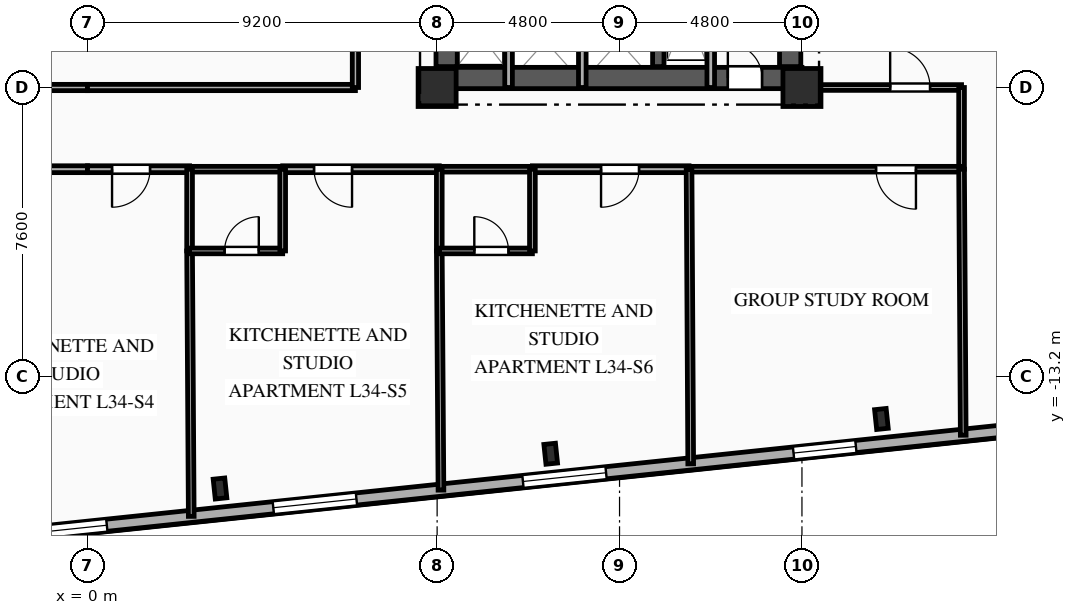
"""IFC4 building model, lengths in metres.
Left out: names, types, materials, properties, quantities, classifications, styles, units other than length and angle.
Written with IfcOpenShell. Run it as: python <this file> out.ifc"""

import sys

from ifc_helpers import new_model, si_unit, direction, frame, frame_2d, origin, origin_2d, place, context, subcontext, project, spatial, rectangle, i_section, extrude, element, fill, save


model = new_model("IFC4")
c1 = context("Model", 3, precision=1e-05, world=origin(), true_north=direction((0.0, 1.0)))
c2 = subcontext(c1, "Body", "Model", "MODEL_VIEW")
j1 = project(units=[si_unit("LENGTHUNIT", "METRE"), si_unit("PLANEANGLEUNIT", "RADIAN")], contexts=[c1])
p1 = place(None, origin())
s1 = spatial("IfcSite", under=j1, at=p1, CompositionType="ELEMENT")
p2 = place(p1, origin())
s2 = spatial("IfcBuilding", under=s1, at=p2, CompositionType="ELEMENT")
p3 = place(p2, frame((0.0, 0.0, 122.55)))
s3 = spatial("IfcBuildingStorey", under=s2, at=p3, CompositionType="ELEMENT", Elevation=122.55)
for number, where, z_axis, x_axis in (
    (1, (9.2, -5.6, 0.0), (0.0, 0.0, 1.0), (1.0, 0.0, 0.0)),
    (2, (18.8, -5.6, 0.0), (0.0, 0.0, 1.0), (1.0, 0.0, 0.0)),
):
    element("IfcColumn", number, at=place(p3, frame(where, z_axis=z_axis, x_axis=x_axis)), inside=s3, PredefinedType="COLUMN", context=c2, shape_type="SweptSolid", body=[
        extrude(rectangle(XDim=1.0, YDim=1.0, at=origin_2d()), origin(), (0.0, 0.0, 1.0), 3.35),
    ])
for number, where, z_axis, x_axis in (
    (3, (3.487, -16.151, 0.0), (0.0, 0.0, 1.0), (0.995, 0.105, 0.0)),
    (4, (12.189, -15.237, 0.0), (0.0, 0.0, 1.0), (0.995, 0.105, 0.0)),
    (5, (20.891, -14.322, 0.0), (0.0, 0.0, 1.0), (0.995, 0.105, 0.0)),
):
    element("IfcColumn", number, at=place(p3, frame(where, z_axis=z_axis, x_axis=x_axis)), inside=s3, PredefinedType="COLUMN", context=c2, shape_type="SweptSolid", body=[
        extrude(i_section(OverallWidth=0.306, OverallDepth=0.524, WebThickness=0.021, FlangeThickness=0.04, FilletRadius=0.027, at=origin_2d()), origin(), (0.0, 0.0, 1.0), 3.35),
    ])
p4 = place(p3, frame((30.307, -13.986, 0.0), z_axis=(0.0, 0.0, 1.0), x_axis=(-0.994521628355, -0.104531003701, 0.0)))
e6 = element("IfcWall", 6, at=p4, inside=s3, PredefinedType="SOLIDWALL", context=c2, shape_type="SweptSolid", body=[
    extrude(rectangle(XDim=53.8, YDim=0.32, at=frame_2d((26.9, 0.0))), origin(), (0.0, 0.0, 1.0), 3.0),
])
p5 = place(p4, frame((3.098, 0.0, 0.85)))
e7 = element("IfcOpeningElement", 7, at=p5, cuts=e6, PredefinedType="OPENING", context=c2, shape_type="SweptSolid", body=[
    extrude(rectangle(XDim=1.65, YDim=1.85, at=frame_2d((0.825, 0.925))), frame((0.0, 0.17, 0.0), z_axis=(0.0, -1.0, 0.0), x_axis=(1.0, 0.0, 0.0)), (0.0, 0.0, 1.0), 0.34),
])
p6 = place(p4, frame((10.143, 0.0, 0.85)))
e8 = element("IfcOpeningElement", 8, at=p6, cuts=e6, PredefinedType="OPENING", context=c2, shape_type="SweptSolid", body=[
    extrude(rectangle(XDim=1.65, YDim=1.85, at=frame_2d((0.825, 0.925))), frame((0.0, 0.17, 0.0), z_axis=(0.0, -1.0, 0.0), x_axis=(1.0, 0.0, 0.0)), (0.0, 0.0, 1.0), 0.34),
])
p7 = place(p4, frame((16.753, 0.0, 0.85)))
e9 = element("IfcOpeningElement", 9, at=p7, cuts=e6, PredefinedType="OPENING", context=c2, shape_type="SweptSolid", body=[
    extrude(rectangle(XDim=2.2, YDim=1.85, at=frame_2d((1.1, 0.925))), frame((0.0, 0.17, 0.0), z_axis=(0.0, -1.0, 0.0), x_axis=(1.0, 0.0, 0.0)), (0.0, 0.0, 1.0), 0.34),
])
p8 = place(p4, frame((23.358, 0.0, 0.85)))
e10 = element("IfcOpeningElement", 10, at=p8, cuts=e6, PredefinedType="OPENING", context=c2, shape_type="SweptSolid", body=[
    extrude(rectangle(XDim=2.2, YDim=1.85, at=frame_2d((1.1, 0.925))), frame((0.0, 0.17, 0.0), z_axis=(0.0, -1.0, 0.0), x_axis=(1.0, 0.0, 0.0)), (0.0, 0.0, 1.0), 0.34),
])
p9 = place(p4, frame((29.963, 0.0, 0.85)))
e11 = element("IfcOpeningElement", 11, at=p9, cuts=e6, PredefinedType="OPENING", context=c2, shape_type="SweptSolid", body=[
    extrude(rectangle(XDim=2.2, YDim=1.85, at=frame_2d((1.1, 0.925))), frame((0.0, 0.17, 0.0), z_axis=(0.0, -1.0, 0.0), x_axis=(1.0, 0.0, 0.0)), (0.0, 0.0, 1.0), 0.34),
])
p10 = place(p4, frame((36.568, 0.0, 0.85)))
e12 = element("IfcOpeningElement", 12, at=p10, cuts=e6, PredefinedType="OPENING", context=c2, shape_type="SweptSolid", body=[
    extrude(rectangle(XDim=2.2, YDim=1.85, at=frame_2d((1.1, 0.925))), frame((0.0, 0.17, 0.0), z_axis=(0.0, -1.0, 0.0), x_axis=(1.0, 0.0, 0.0)), (0.0, 0.0, 1.0), 0.34),
])
p11 = place(p4, frame((43.173, 0.0, 0.85)))
e13 = element("IfcOpeningElement", 13, at=p11, cuts=e6, PredefinedType="OPENING", context=c2, shape_type="SweptSolid", body=[
    extrude(rectangle(XDim=2.2, YDim=1.85, at=frame_2d((1.1, 0.925))), frame((0.0, 0.17, 0.0), z_axis=(0.0, -1.0, 0.0), x_axis=(1.0, 0.0, 0.0)), (0.0, 0.0, 1.0), 0.34),
])
p12 = place(p4, frame((49.653, 0.0, 0.85)))
e14 = element("IfcOpeningElement", 14, at=p12, cuts=e6, PredefinedType="OPENING", context=c2, shape_type="SweptSolid", body=[
    extrude(rectangle(XDim=1.65, YDim=1.85, at=frame_2d((0.825, 0.925))), frame((0.0, 0.17, 0.0), z_axis=(0.0, -1.0, 0.0), x_axis=(1.0, 0.0, 0.0)), (0.0, 0.0, 1.0), 0.34),
])
p13 = place(p3, frame((9.2, -5.35, 0.0), z_axis=(0.0, 0.0, 1.0), x_axis=(1.0, 0.0, 0.0)))
e15 = element("IfcWall", 15, at=p13, inside=s3, PredefinedType="SHEAR", context=c2, shape_type="SweptSolid", body=[
    extrude(rectangle(XDim=9.6, YDim=0.56, at=frame_2d((4.8, 0.0))), origin(), (0.0, 0.0, 1.0), 3.0),
])
p14 = place(p13, frame((7.65, 0.0, 0.0)))
e16 = element("IfcOpeningElement", 16, at=p14, cuts=e15, PredefinedType="OPENING", context=c2, shape_type="SweptSolid", body=[
    extrude(rectangle(XDim=0.9, YDim=2.1, at=frame_2d((0.45, 1.05))), frame((0.0, 0.29, 0.0), z_axis=(0.0, -1.0, 0.0), x_axis=(1.0, 0.0, 0.0)), (0.0, 0.0, 1.0), 0.58),
])
p15 = place(p3, frame((9.45, -5.05, 0.0), z_axis=(0.0, 0.0, 1.0), x_axis=(0.0, 1.0, 0.0)))
e17 = element("IfcWall", 17, at=p15, inside=s3, PredefinedType="SHEAR", context=c2, shape_type="SweptSolid", body=[
    extrude(rectangle(XDim=10.1, YDim=0.56, at=frame_2d((5.05, 0.0))), origin(), (0.0, 0.0, 1.0), 3.0),
])
p16 = place(p15, frame((7.15, 0.0, 0.0)))
e18 = element("IfcOpeningElement", 18, at=p16, cuts=e17, PredefinedType="OPENING", context=c2, shape_type="SweptSolid", body=[
    extrude(rectangle(XDim=0.9, YDim=2.1, at=frame_2d((0.45, 1.05))), frame((0.0, 0.29, 0.0), z_axis=(0.0, -1.0, 0.0), x_axis=(1.0, 0.0, 0.0)), (0.0, 0.0, 1.0), 0.58),
])
p17 = place(p15, frame((2.4, 0.0, 0.0)))
e19 = element("IfcOpeningElement", 19, at=p17, cuts=e17, PredefinedType="OPENING", context=c2, shape_type="SweptSolid", body=[
    extrude(rectangle(XDim=1.2, YDim=2.15, at=frame_2d((0.6, 1.075))), frame((0.0, 0.29, 0.0), z_axis=(0.0, -1.0, 0.0), x_axis=(1.0, 0.0, 0.0)), (0.0, 0.0, 1.0), 0.58),
])
p18 = place(p3, frame((18.49, -5.05, 0.0), z_axis=(0.0, 0.0, 1.0), x_axis=(0.0, 1.0, 0.0)))
e20 = element("IfcWall", 20, at=p18, inside=s3, PredefinedType="SHEAR", context=c2, shape_type="SweptSolid", body=[
    extrude(rectangle(XDim=10.1, YDim=0.56, at=frame_2d((5.05, 0.0))), origin(), (0.0, 0.0, 1.0), 3.0),
])
p19 = place(p3, frame((15.02, -5.05, 0.0), z_axis=(0.0, 0.0, 1.0), x_axis=(0.0, 1.0, 0.0)))
e21 = element("IfcWall", 21, at=p19, inside=s3, PredefinedType="SHEAR", context=c2, shape_type="SweptSolid", body=[
    extrude(rectangle(XDim=10.1, YDim=0.3, at=frame_2d((5.05, 0.0))), origin(), (0.0, 0.0, 1.0), 3.0),
])
p20 = place(p3, frame((16.4, -2.11, 0.0), z_axis=(0.0, 0.0, 1.0), x_axis=(0.0, -1.0, 0.0)))
e22 = element("IfcWall", 22, at=p20, inside=s3, PredefinedType="PARTITIONING", context=c2, shape_type="SweptSolid", body=[
    extrude(rectangle(XDim=3.49, YDim=0.2, at=frame_2d((1.745, 0.0))), origin(), (0.0, 0.0, 1.0), 3.0),
])
for number, where, z_axis, x_axis in (
    (23, (11.08, -5.6, 0.0), (0.0, 0.0, 1.0), (0.0, 1.0, 0.0)),
    (24, (13.02, -5.6, 0.0), (0.0, 0.0, 1.0), (0.0, 1.0, 0.0)),
):
    element("IfcWall", number, at=place(p3, frame(where, z_axis=z_axis, x_axis=x_axis)), inside=s3, PredefinedType="PARTITIONING", context=c2, shape_type="SweptSolid", body=[
        extrude(rectangle(XDim=2.25, YDim=0.2, at=frame_2d((1.125, 0.0))), origin(), (0.0, 0.0, 1.0), 3.0),
    ])
p21 = place(p3, frame((0.0, -7.75, 0.0), z_axis=(0.0, 0.0, 1.0), x_axis=(-1.0, 0.0, 0.0)))
e25 = element("IfcWall", 25, at=p21, inside=s3, PredefinedType="PARTITIONING", context=c2, shape_type="SweptSolid", body=[
    extrude(rectangle(XDim=1.436, YDim=0.18, at=frame_2d((0.718, 0.0))), origin(), (0.0, 0.0, 1.0), 3.0),
])
p22 = place(p3, frame((-7.05, -5.6, 0.0), z_axis=(0.0, 0.0, 1.0), x_axis=(1.0, 0.0, 0.0)))
e26 = element("IfcWall", 26, at=p22, inside=s3, PredefinedType="PARTITIONING", context=c2, shape_type="SweptSolid", body=[
    extrude(rectangle(XDim=7.05, YDim=0.165, at=frame_2d((3.525, 0.0))), origin(), (0.0, 0.0, 1.0), 2.485),
])
p23 = place(p22, frame((4.728, 0.0, 0.0)))
e27 = element("IfcOpeningElement", 27, at=p23, cuts=e26, PredefinedType="OPENING", context=c2, shape_type="SweptSolid", body=[
    extrude(rectangle(XDim=1.15, YDim=2.15, at=frame_2d((0.575, 1.075))), frame((0.0, 0.093, 0.0), z_axis=(0.0, -1.0, 0.0), x_axis=(1.0, 0.0, 0.0)), (0.0, 0.0, 1.0), 0.185),
])
p24 = place(p3, frame((18.8, -5.6, 0.0), z_axis=(0.0, 0.0, 1.0), x_axis=(1.0, 0.0, 0.0)))
e28 = element("IfcWall", 28, at=p24, inside=s3, PredefinedType="PARTITIONING", context=c2, shape_type="SweptSolid", body=[
    extrude(rectangle(XDim=4.2, YDim=0.15, at=frame_2d((2.1, 0.0))), origin(), (0.0, 0.0, 1.0), 2.485),
])
p25 = place(p24, frame((2.321, 0.0, 0.0)))
e29 = element("IfcOpeningElement", 29, at=p25, cuts=e28, PredefinedType="OPENING", context=c2, shape_type="SweptSolid", body=[
    extrude(rectangle(XDim=1.05, YDim=2.15, at=frame_2d((0.525, 1.075))), frame((0.0, 0.085, 0.0), z_axis=(0.0, -1.0, 0.0), x_axis=(1.0, 0.0, 0.0)), (0.0, 0.0, 1.0), 0.17),
])
p26 = place(p3, frame((23.0, -5.6, 0.0), z_axis=(0.0, 0.0, 1.0), x_axis=(0.0, -1.0, 0.0)))
e30 = element("IfcWall", 30, at=p26, inside=s3, PredefinedType="PARTITIONING", context=c2, shape_type="SweptSolid", body=[
    extrude(rectangle(XDim=2.15, YDim=0.15, at=frame_2d((1.075, 0.0))), origin(), (0.0, 0.0, 1.0), 3.0),
])
p27 = place(p3, frame((2.686, -7.75, 0.0), z_axis=(0.0, 0.0, 1.0), x_axis=(-1.0, 0.0, 0.0)))
e31 = element("IfcWall", 31, at=p27, inside=s3, PredefinedType="PARTITIONING", context=c2, shape_type="SweptSolid", body=[
    extrude(rectangle(XDim=2.686, YDim=0.18, at=frame_2d((1.343, 0.0))), origin(), (0.0, 0.0, 1.0), 3.0),
])
p28 = place(p27, frame((1.04, 0.0, 0.0)))
e32 = element("IfcOpeningElement", 32, at=p28, cuts=e31, PredefinedType="OPENING", context=c2, shape_type="SweptSolid", body=[
    extrude(rectangle(XDim=1.0, YDim=2.15, at=frame_2d((0.5, 1.075))), frame((0.0, 0.1, 0.0), z_axis=(0.0, -1.0, 0.0), x_axis=(1.0, 0.0, 0.0)), (0.0, 0.0, 1.0), 0.2),
])
p29 = place(p3, frame((9.257, -7.75, 0.0), z_axis=(0.0, 0.0, 1.0), x_axis=(-1.0, 0.0, 0.0)))
e33 = element("IfcWall", 33, at=p29, inside=s3, PredefinedType="PARTITIONING", context=c2, shape_type="SweptSolid", body=[
    extrude(rectangle(XDim=4.121, YDim=0.18, at=frame_2d((2.061, 0.0))), origin(), (0.0, 0.0, 1.0), 3.0),
])
p30 = place(p29, frame((2.296, 0.0, 0.0)))
e34 = element("IfcOpeningElement", 34, at=p30, cuts=e33, PredefinedType="OPENING", context=c2, shape_type="SweptSolid", body=[
    extrude(rectangle(XDim=1.0, YDim=2.15, at=frame_2d((0.5, 1.075))), frame((0.0, 0.1, 0.0), z_axis=(0.0, -1.0, 0.0), x_axis=(1.0, 0.0, 0.0)), (0.0, 0.0, 1.0), 0.2),
])
p31 = place(p3, frame((5.136, -7.75, 0.0), z_axis=(0.0, 0.0, 1.0), x_axis=(-1.0, 0.0, 0.0)))
e35 = element("IfcWall", 35, at=p31, inside=s3, PredefinedType="PLUMBINGWALL", context=c2, shape_type="SweptSolid", body=[
    extrude(rectangle(XDim=2.45, YDim=0.15, at=frame_2d((1.225, 0.0))), origin(), (0.0, 0.0, 1.0), 3.0),
])
p32 = place(p3, frame((15.829, -7.75, 0.0), z_axis=(0.0, 0.0, 1.0), x_axis=(-1.0, 0.0, 0.0)))
e36 = element("IfcWall", 36, at=p32, inside=s3, PredefinedType="PARTITIONING", context=c2, shape_type="SweptSolid", body=[
    extrude(rectangle(XDim=4.122, YDim=0.18, at=frame_2d((2.061, 0.0))), origin(), (0.0, 0.0, 1.0), 3.0),
])
p33 = place(p32, frame((1.316, 0.0, 0.0)))
e37 = element("IfcOpeningElement", 37, at=p33, cuts=e36, PredefinedType="OPENING", context=c2, shape_type="SweptSolid", body=[
    extrude(rectangle(XDim=1.0, YDim=2.15, at=frame_2d((0.5, 1.075))), frame((0.0, 0.1, 0.0), z_axis=(0.0, -1.0, 0.0), x_axis=(1.0, 0.0, 0.0)), (0.0, 0.0, 1.0), 0.2),
])
p34 = place(p3, frame((11.707, -7.75, 0.0), z_axis=(0.0, 0.0, 1.0), x_axis=(-1.0, 0.0, 0.0)))
e38 = element("IfcWall", 38, at=p34, inside=s3, PredefinedType="PLUMBINGWALL", context=c2, shape_type="SweptSolid", body=[
    extrude(rectangle(XDim=2.45, YDim=0.15, at=frame_2d((1.225, 0.0))), origin(), (0.0, 0.0, 1.0), 3.0),
])
p35 = place(p3, frame((23.0, -7.75, 0.0), z_axis=(0.0, 0.0, 1.0), x_axis=(-1.0, 0.0, 0.0)))
e39 = element("IfcWall", 39, at=p35, inside=s3, PredefinedType="PARTITIONING", context=c2, shape_type="SweptSolid", body=[
    extrude(rectangle(XDim=7.171, YDim=0.15, at=frame_2d((3.585, 0.0))), origin(), (0.0, 0.0, 1.0), 3.0),
])
p36 = place(p35, frame((1.2, 0.0, 0.0)))
e40 = element("IfcOpeningElement", 40, at=p36, cuts=e39, PredefinedType="OPENING", context=c2, shape_type="SweptSolid", body=[
    extrude(rectangle(XDim=1.05, YDim=2.15, at=frame_2d((0.525, 1.075))), frame((0.0, 0.085, 0.0), z_axis=(0.0, -1.0, 0.0), x_axis=(1.0, 0.0, 0.0)), (0.0, 0.0, 1.0), 0.17),
])
p37 = place(p3, frame((0.0, -5.6, 0.0), z_axis=(0.0, 0.0, 1.0), x_axis=(1.0, 0.0, 0.0)))
e41 = element("IfcWall", 41, at=p37, inside=s3, PredefinedType="PARTITIONING", context=c2, shape_type="SweptSolid", body=[
    extrude(rectangle(XDim=7.05, YDim=0.165, at=frame_2d((3.525, 0.0))), origin(), (0.0, 0.0, 1.0), 2.485),
])
p38 = place(p3, frame((7.05, -5.6, 0.0), z_axis=(0.0, 0.0, 1.0), x_axis=(0.0, 1.0, 0.0)))
e42 = element("IfcWall", 42, at=p38, inside=s3, PredefinedType="PARTITIONING", context=c2, shape_type="SweptSolid", body=[
    extrude(rectangle(XDim=7.05, YDim=0.165, at=frame_2d((3.525, 0.0))), origin(), (0.0, 0.0, 1.0), 3.0),
])
p39 = place(p3, frame((23.044, -14.749, 0.0), z_axis=(0.0, 0.0, 1.0), x_axis=(-0.006278653971, 0.999980289058, 0.0)))
e43 = element("IfcWall", 43, at=p39, inside=s3, PredefinedType="PARTITIONING", context=c2, shape_type="SweptSolid", body=[
    extrude(rectangle(XDim=6.999, YDim=0.15, at=frame_2d((3.5, 0.0))), origin(), (0.0, 0.0, 1.0), 3.0),
])
p40 = place(p3, frame((2.686, -9.9, 0.0), z_axis=(0.0, 0.0, 1.0), x_axis=(0.006291821768, -0.999980206294, 0.0)))
e44 = element("IfcWall", 44, at=p40, inside=s3, PredefinedType="PARTITIONING", context=c2, shape_type="SweptSolid", body=[
    extrude(rectangle(XDim=6.985, YDim=0.15, at=frame_2d((3.492, 0.0))), origin(), (0.0, 0.0, 1.0), 3.0),
])
p41 = place(p3, frame((2.686, -7.75, 0.0), z_axis=(0.0, 0.0, 1.0), x_axis=(0.0, -1.0, 0.0)))
e45 = element("IfcWall", 45, at=p41, inside=s3, PredefinedType="PLUMBINGWALL", context=c2, shape_type="SweptSolid", body=[
    extrude(rectangle(XDim=2.15, YDim=0.15, at=frame_2d((1.075, 0.0))), origin(), (0.0, 0.0, 1.0), 3.0),
])
p42 = place(p3, frame((2.686, -9.9, 0.0), z_axis=(0.0, 0.0, 1.0), x_axis=(1.0, 0.0, 0.0)))
e46 = element("IfcWall", 46, at=p42, inside=s3, PredefinedType="PLUMBINGWALL", context=c2, shape_type="SweptSolid", body=[
    extrude(rectangle(XDim=2.45, YDim=0.15, at=frame_2d((1.225, 0.0))), origin(), (0.0, 0.0, 1.0), 3.0),
])
p43 = place(p42, frame((0.921, 0.0, 0.0)))
e47 = element("IfcOpeningElement", 47, at=p43, cuts=e46, PredefinedType="OPENING", context=c2, shape_type="SweptSolid", body=[
    extrude(rectangle(XDim=0.9, YDim=2.1, at=frame_2d((0.45, 1.05))), frame((0.0, 0.085, 0.0), z_axis=(0.0, -1.0, 0.0), x_axis=(1.0, 0.0, 0.0)), (0.0, 0.0, 1.0), 0.17),
])
p44 = place(p3, frame((5.136, -9.9, 0.0), z_axis=(0.0, 0.0, 1.0), x_axis=(0.0, 1.0, 0.0)))
e48 = element("IfcWall", 48, at=p44, inside=s3, PredefinedType="PLUMBINGWALL", context=c2, shape_type="SweptSolid", body=[
    extrude(rectangle(XDim=2.15, YDim=0.15, at=frame_2d((1.075, 0.0))), origin(), (0.0, 0.0, 1.0), 3.0),
])
p45 = place(p3, frame((9.257, -9.9, 0.0), z_axis=(0.0, 0.0, 1.0), x_axis=(0.006943468909, -0.999975893829, 0.0)))
e49 = element("IfcWall", 49, at=p45, inside=s3, PredefinedType="PARTITIONING", context=c2, shape_type="SweptSolid", body=[
    extrude(rectangle(XDim=6.294, YDim=0.15, at=frame_2d((3.147, 0.0))), origin(), (0.0, 0.0, 1.0), 3.0),
])
p46 = place(p3, frame((9.257, -7.75, 0.0), z_axis=(0.0, 0.0, 1.0), x_axis=(0.0, -1.0, 0.0)))
e50 = element("IfcWall", 50, at=p46, inside=s3, PredefinedType="PLUMBINGWALL", context=c2, shape_type="SweptSolid", body=[
    extrude(rectangle(XDim=2.15, YDim=0.15, at=frame_2d((1.075, 0.0))), origin(), (0.0, 0.0, 1.0), 3.0),
])
p47 = place(p3, frame((9.257, -9.9, 0.0), z_axis=(0.0, 0.0, 1.0), x_axis=(1.0, 0.0, 0.0)))
e51 = element("IfcWall", 51, at=p47, inside=s3, PredefinedType="PLUMBINGWALL", context=c2, shape_type="SweptSolid", body=[
    extrude(rectangle(XDim=2.45, YDim=0.15, at=frame_2d((1.225, 0.0))), origin(), (0.0, 0.0, 1.0), 3.0),
])
p48 = place(p47, frame((0.921, 0.0, 0.0)))
e52 = element("IfcOpeningElement", 52, at=p48, cuts=e51, PredefinedType="OPENING", context=c2, shape_type="SweptSolid", body=[
    extrude(rectangle(XDim=0.9, YDim=2.1, at=frame_2d((0.45, 1.05))), frame((0.0, 0.085, 0.0), z_axis=(0.0, -1.0, 0.0), x_axis=(1.0, 0.0, 0.0)), (0.0, 0.0, 1.0), 0.17),
])
p49 = place(p3, frame((11.707, -9.9, 0.0), z_axis=(0.0, 0.0, 1.0), x_axis=(0.0, 1.0, 0.0)))
e53 = element("IfcWall", 53, at=p49, inside=s3, PredefinedType="PLUMBINGWALL", context=c2, shape_type="SweptSolid", body=[
    extrude(rectangle(XDim=2.15, YDim=0.15, at=frame_2d((1.075, 0.0))), origin(), (0.0, 0.0, 1.0), 3.0),
])
p50 = place(p3, frame((15.829, -7.75, 0.0), z_axis=(0.0, 0.0, 1.0), x_axis=(0.00563681802, -0.999984113015, 0.0)))
e54 = element("IfcWall", 54, at=p50, inside=s3, PredefinedType="PARTITIONING", context=c2, shape_type="SweptSolid", body=[
    extrude(rectangle(XDim=7.753, YDim=0.15, at=frame_2d((3.876, 0.0))), origin(), (0.0, 0.0, 1.0), 3.0),
])
p51 = place(p6, origin())
e55 = element("IfcWindow", 55, at=p51, inside=s3, PartitioningType="SINGLE_PANEL", PredefinedType="WINDOW", context=c2, shape_type="SweptSolid", body=[
    extrude(rectangle(XDim=1.65, YDim=1.85, at=frame_2d((0.825, 0.925))), frame((0.0, 0.03, 0.0), z_axis=(0.0, -1.0, 0.0), x_axis=(1.0, 0.0, 0.0)), (0.0, 0.0, 1.0), 0.06),
])
fill(e8, e55)
p52 = place(p7, origin())
e56 = element("IfcWindow", 56, at=p52, inside=s3, PartitioningType="SINGLE_PANEL", PredefinedType="WINDOW", context=c2, shape_type="SweptSolid", body=[
    extrude(rectangle(XDim=2.2, YDim=1.85, at=frame_2d((1.1, 0.925))), frame((0.0, 0.03, 0.0), z_axis=(0.0, -1.0, 0.0), x_axis=(1.0, 0.0, 0.0)), (0.0, 0.0, 1.0), 0.06),
])
fill(e9, e56)
p53 = place(p8, origin())
e57 = element("IfcWindow", 57, at=p53, inside=s3, PartitioningType="SINGLE_PANEL", PredefinedType="WINDOW", context=c2, shape_type="SweptSolid", body=[
    extrude(rectangle(XDim=2.2, YDim=1.85, at=frame_2d((1.1, 0.925))), frame((0.0, 0.03, 0.0), z_axis=(0.0, -1.0, 0.0), x_axis=(1.0, 0.0, 0.0)), (0.0, 0.0, 1.0), 0.06),
])
fill(e10, e57)
p54 = place(p9, origin())
e58 = element("IfcWindow", 58, at=p54, inside=s3, PartitioningType="SINGLE_PANEL", PredefinedType="WINDOW", context=c2, shape_type="SweptSolid", body=[
    extrude(rectangle(XDim=2.2, YDim=1.85, at=frame_2d((1.1, 0.925))), frame((0.0, 0.03, 0.0), z_axis=(0.0, -1.0, 0.0), x_axis=(1.0, 0.0, 0.0)), (0.0, 0.0, 1.0), 0.06),
])
fill(e11, e58)
p55 = place(p14, origin())
e59 = element("IfcDoor", 59, at=p55, inside=s3, OperationType="SINGLE_SWING_LEFT", PredefinedType="DOOR", context=c2, shape_type="SweptSolid", body=[
    extrude(rectangle(XDim=0.9, YDim=2.1, at=frame_2d((0.45, 1.05))), frame((0.0, 0.025, 0.0), z_axis=(0.0, -1.0, 0.0), x_axis=(1.0, 0.0, 0.0)), (0.0, 0.0, 1.0), 0.05),
])
fill(e16, e59)
p56 = place(p25, origin())
e60 = element("IfcDoor", 60, at=p56, inside=s3, OperationType="SINGLE_SWING_LEFT", PredefinedType="DOOR", context=c2, shape_type="SweptSolid", body=[
    extrude(rectangle(XDim=1.05, YDim=2.15, at=frame_2d((0.525, 1.075))), frame((0.0, 0.025, 0.0), z_axis=(0.0, -1.0, 0.0), x_axis=(1.0, 0.0, 0.0)), (0.0, 0.0, 1.0), 0.05),
])
fill(e29, e60)
p57 = place(p28, origin())
e61 = element("IfcDoor", 61, at=p57, inside=s3, OperationType="SINGLE_SWING_RIGHT", PredefinedType="DOOR", context=c2, shape_type="SweptSolid", body=[
    extrude(rectangle(XDim=1.0, YDim=2.15, at=frame_2d((0.5, 1.075))), frame((0.0, 0.025, 0.0), z_axis=(0.0, -1.0, 0.0), x_axis=(1.0, 0.0, 0.0)), (0.0, 0.0, 1.0), 0.05),
])
fill(e32, e61)
p58 = place(p30, origin())
e62 = element("IfcDoor", 62, at=p58, inside=s3, OperationType="SINGLE_SWING_LEFT", PredefinedType="DOOR", context=c2, shape_type="SweptSolid", body=[
    extrude(rectangle(XDim=1.0, YDim=2.15, at=frame_2d((0.5, 1.075))), frame((0.0, 0.025, 0.0), z_axis=(0.0, -1.0, 0.0), x_axis=(1.0, 0.0, 0.0)), (0.0, 0.0, 1.0), 0.05),
])
fill(e34, e62)
p59 = place(p33, origin())
e63 = element("IfcDoor", 63, at=p59, inside=s3, OperationType="SINGLE_SWING_RIGHT", PredefinedType="DOOR", context=c2, shape_type="SweptSolid", body=[
    extrude(rectangle(XDim=1.0, YDim=2.15, at=frame_2d((0.5, 1.075))), frame((0.0, 0.025, 0.0), z_axis=(0.0, -1.0, 0.0), x_axis=(1.0, 0.0, 0.0)), (0.0, 0.0, 1.0), 0.05),
])
fill(e37, e63)
p60 = place(p36, origin())
e64 = element("IfcDoor", 64, at=p60, inside=s3, OperationType="SINGLE_SWING_LEFT", PredefinedType="DOOR", context=c2, shape_type="SweptSolid", body=[
    extrude(rectangle(XDim=1.05, YDim=2.15, at=frame_2d((0.525, 1.075))), frame((0.0, 0.025, 0.0), z_axis=(0.0, -1.0, 0.0), x_axis=(1.0, 0.0, 0.0)), (0.0, 0.0, 1.0), 0.05),
])
fill(e40, e64)
p61 = place(p43, origin())
e65 = element("IfcDoor", 65, at=p61, inside=s3, OperationType="SINGLE_SWING_RIGHT", PredefinedType="DOOR", context=c2, shape_type="SweptSolid", body=[
    extrude(rectangle(XDim=0.9, YDim=2.1, at=frame_2d((0.45, 1.05))), frame((0.0, 0.025, 0.0), z_axis=(0.0, -1.0, 0.0), x_axis=(1.0, 0.0, 0.0)), (0.0, 0.0, 1.0), 0.05),
])
fill(e47, e65)
p62 = place(p48, origin())
e66 = element("IfcDoor", 66, at=p62, inside=s3, OperationType="SINGLE_SWING_LEFT", PredefinedType="DOOR", context=c2, shape_type="SweptSolid", body=[
    extrude(rectangle(XDim=0.9, YDim=2.1, at=frame_2d((0.45, 1.05))), frame((0.0, 0.025, 0.0), z_axis=(0.0, -1.0, 0.0), x_axis=(1.0, 0.0, 0.0)), (0.0, 0.0, 1.0), 0.05),
])
fill(e52, e66)
save(model, sys.argv[1])
